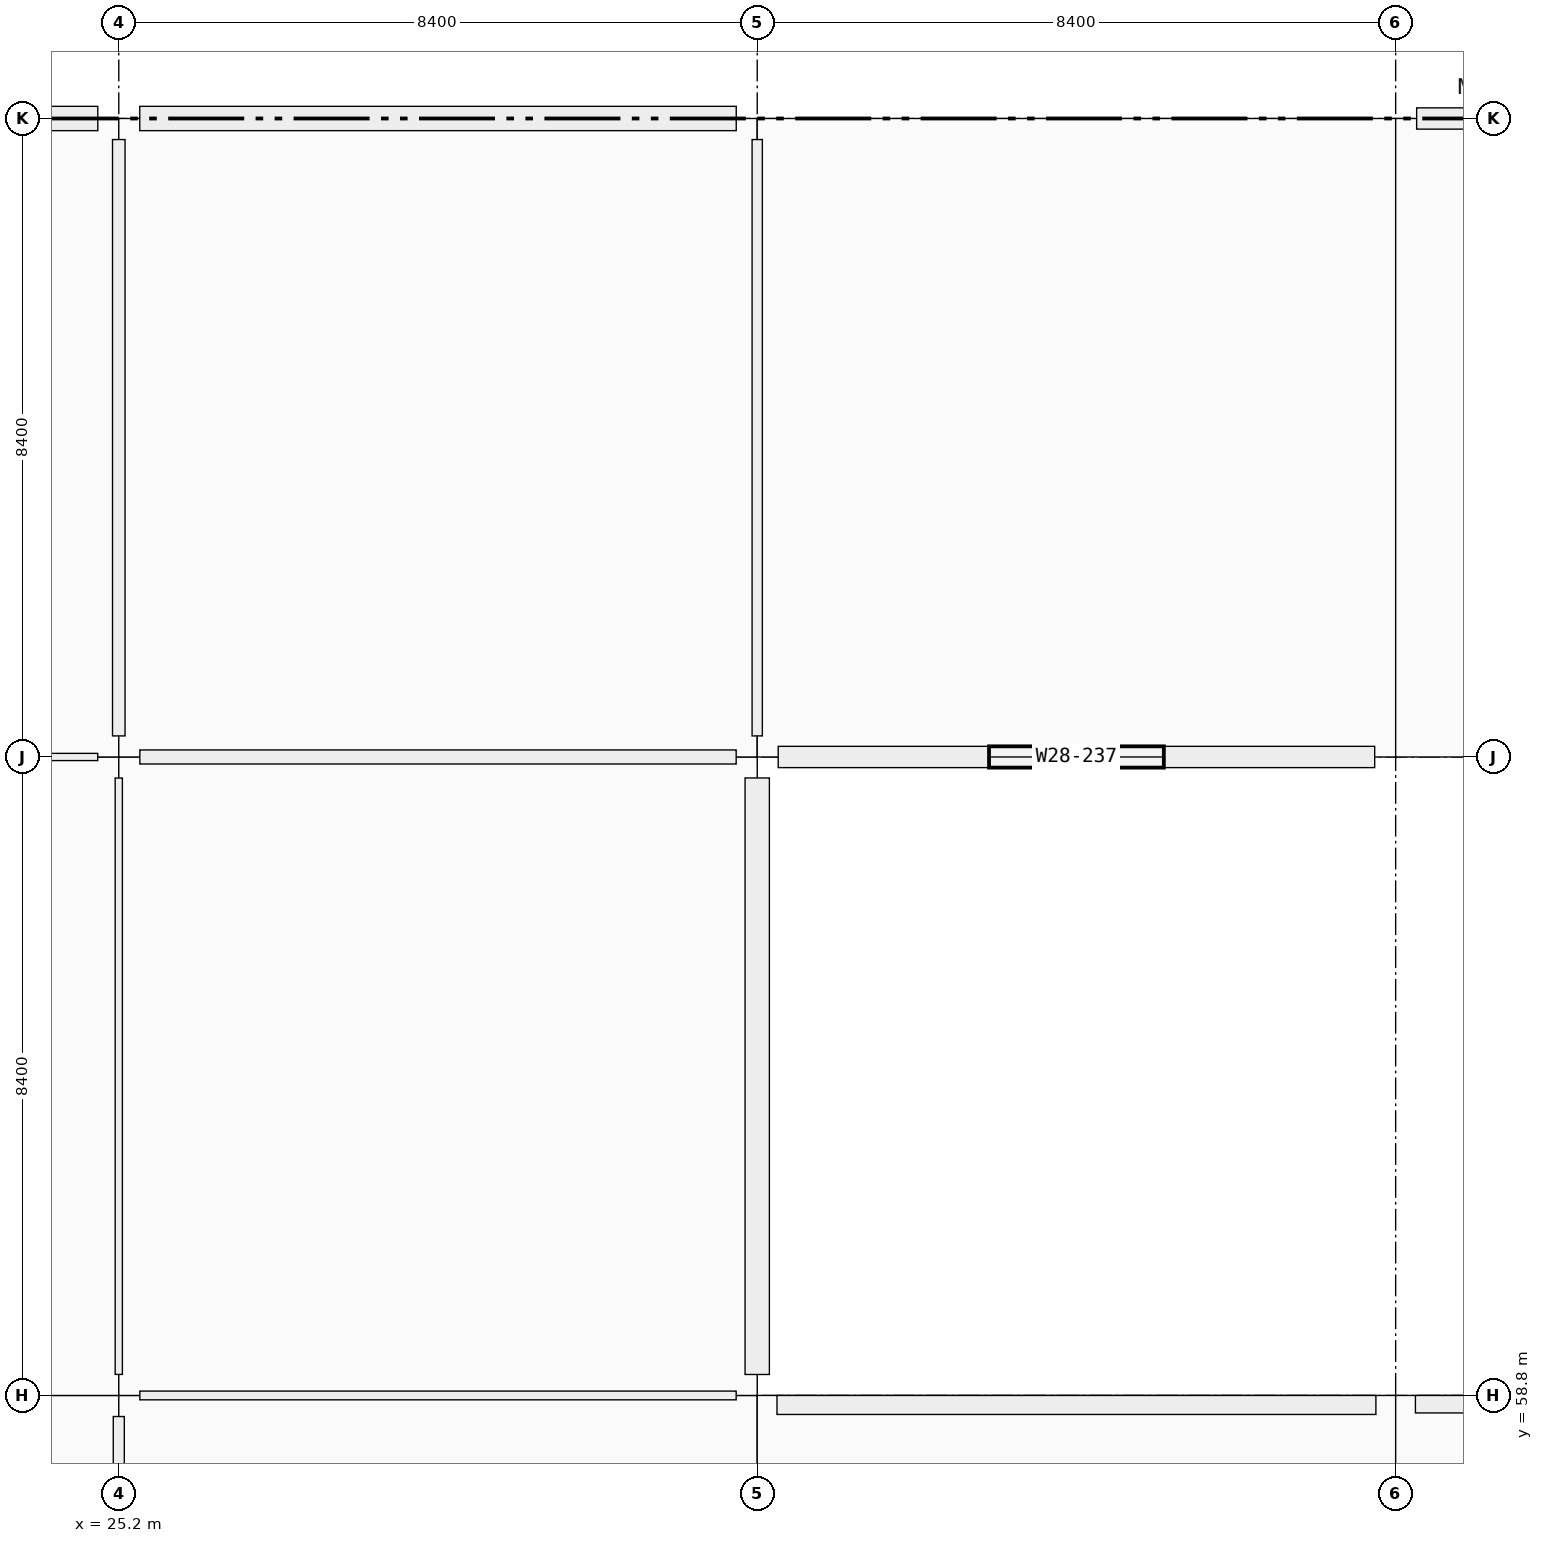
"""IFC4 building model, lengths in metres.
Left out: names, types, materials, properties, quantities, classifications, styles, units other than length and angle.
Written with IfcOpenShell. Run it as: python <this file> out.ifc"""

import sys

from ifc_helpers import new_model, si_unit, direction, frame, frame_2d, origin, origin_2d, place, context, subcontext, project, spatial, rectangle, i_section, extrude, element, fill, save


model = new_model("IFC4")
c1 = context("Model", 3, precision=1e-05, world=origin(), true_north=direction((0.0, 1.0)))
c2 = subcontext(c1, "Body", "Model", "MODEL_VIEW")
j1 = project(units=[si_unit("LENGTHUNIT", "METRE"), si_unit("PLANEANGLEUNIT", "RADIAN")], contexts=[c1])
p1 = place(None, origin())
s1 = spatial("IfcSite", under=j1, at=p1, CompositionType="ELEMENT")
p2 = place(p1, origin())
s2 = spatial("IfcBuilding", under=s1, at=p2, CompositionType="ELEMENT")
p3 = place(p2, frame((0.0, 0.0, 19.08)))
s3 = spatial("IfcBuildingStorey", under=s2, at=p3, CompositionType="ELEMENT", Elevation=19.08)
for number, where, z_axis, x_axis in (
    (1, (25.2, 58.8, 0.0), (0.0, 0.0, 1.0), (1.0, 0.0, 0.0)),
    (2, (25.2, 67.2, 0.0), (0.0, 0.0, 1.0), (1.0, 0.0, 0.0)),
    (3, (25.2, 75.6, 0.0), (0.0, 0.0, 1.0), (1.0, 0.0, 0.0)),
    (4, (33.6, 58.8, 0.0), (0.0, 0.0, 1.0), (1.0, 0.0, 0.0)),
    (5, (33.6, 67.2, 0.0), (0.0, 0.0, 1.0), (1.0, 0.0, 0.0)),
    (6, (33.6, 75.6, 0.0), (0.0, 0.0, 1.0), (1.0, 0.0, 0.0)),
):
    element("IfcColumn", number, at=place(p3, frame(where, z_axis=z_axis, x_axis=x_axis)), inside=s3, PredefinedType="COLUMN", context=c2, shape_type="SweptSolid", body=[
        extrude(rectangle(XDim=0.55, YDim=0.55, at=origin_2d()), origin(), (0.0, 0.0, 1.0), 4.16),
    ])
for number, where, z_axis, x_axis in (
    (7, (42.0, 67.2, 0.0), (0.0, 0.0, 1.0), (1.0, 0.0, 0.0)),
    (8, (42.0, 75.6, 0.0), (0.0, 0.0, 1.0), (1.0, 0.0, 0.0)),
):
    element("IfcColumn", number, at=place(p3, frame(where, z_axis=z_axis, x_axis=x_axis)), inside=s3, PredefinedType="COLUMN", context=c2, shape_type="SweptSolid", body=[
        extrude(rectangle(XDim=0.55, YDim=0.55, at=origin_2d()), origin(), (0.0, 0.0, 1.0), 4.07),
    ])
for number, where, z_axis, x_axis in (
    (9, (25.2, 58.8, 4.16), (0.0, 0.0, 1.0), (1.0, 0.0, 0.0)),
    (10, (25.2, 67.2, 4.16), (0.0, 0.0, 1.0), (1.0, 0.0, 0.0)),
    (11, (25.2, 75.6, 4.16), (0.0, 0.0, 1.0), (1.0, 0.0, 0.0)),
):
    element("IfcColumn", number, at=place(p3, frame(where, z_axis=z_axis, x_axis=x_axis)), inside=s3, PredefinedType="COLUMN", context=c2, shape_type="SweptSolid", body=[
        extrude(i_section(OverallWidth=0.305, OverallDepth=0.308, WebThickness=0.01, FlangeThickness=0.015, FilletRadius=0.017, at=origin_2d()), origin(), (0.0, 0.0, 1.0), 1.925),
    ])
p4 = place(p3, frame((17.076, 75.6, 0.0), z_axis=(0.0, 0.0, 1.0), x_axis=(1.0, 0.0, 0.0)))
e12 = element("IfcWall", 12, at=p4, inside=s3, PredefinedType="SOLIDWALL", context=c2, shape_type="SweptSolid", body=[
    extrude(rectangle(XDim=7.848, YDim=0.32, at=frame_2d((3.924, 0.0))), origin(), (0.0, 0.0, 1.0), 3.37),
])
p5 = place(p3, frame((33.6, 66.924, 0.0), z_axis=(0.0, 0.0, 1.0), x_axis=(0.0, -1.0, 0.0)))
e13 = element("IfcWall", 13, at=p5, inside=s3, PredefinedType="SOLIDWALL", context=c2, shape_type="SweptSolid", body=[
    extrude(rectangle(XDim=7.848, YDim=0.32, at=frame_2d((3.924, 0.0))), origin(), (0.0, 0.0, 1.0), 3.37),
])
p6 = place(p5, frame((3.474, 0.0, 0.9)))
e14 = element("IfcOpeningElement", 14, at=p6, cuts=e13, PredefinedType="OPENING", context=c2, shape_type="SweptSolid", body=[
    extrude(rectangle(XDim=0.9, YDim=1.5, at=frame_2d((0.45, 0.75))), frame((0.0, 0.16, 0.0), z_axis=(0.0, -1.0, 0.0), x_axis=(1.0, 0.0, 0.0)), (0.0, 0.0, 1.0), 0.32),
])
p7 = place(p3, frame((25.476, 75.6, 0.0), z_axis=(0.0, 0.0, 1.0), x_axis=(1.0, 0.0, 0.0)))
e15 = element("IfcWall", 15, at=p7, inside=s3, PredefinedType="SOLIDWALL", context=c2, shape_type="SweptSolid", body=[
    extrude(rectangle(XDim=7.848, YDim=0.32, at=frame_2d((3.924, 0.0))), origin(), (0.0, 0.0, 1.0), 3.37),
])
p8 = place(p7, frame((3.074, 0.0, 0.9)))
e16 = element("IfcOpeningElement", 16, at=p8, cuts=e15, PredefinedType="OPENING", context=c2, shape_type="SweptSolid", body=[
    extrude(rectangle(XDim=1.7, YDim=1.85, at=frame_2d((0.85, 0.925))), frame((0.0, 0.16, 0.0), z_axis=(0.0, -1.0, 0.0), x_axis=(1.0, 0.0, 0.0)), (0.0, 0.0, 1.0), 0.32),
])
p9 = place(p3, frame((41.724, 67.2, 0.0), z_axis=(0.0, 0.0, 1.0), x_axis=(-1.0, 0.0, 0.0)))
e17 = element("IfcWall", 17, at=p9, inside=s3, PredefinedType="SOLIDWALL", context=c2, shape_type="SweptSolid", body=[
    extrude(rectangle(XDim=7.848, YDim=0.28, at=frame_2d((3.924, 0.0))), origin(), (0.0, 0.0, 1.0), 3.37),
])
p10 = place(p9, frame((2.774, 0.0, 0.9)))
e18 = element("IfcOpeningElement", 18, at=p10, cuts=e17, PredefinedType="OPENING", context=c2, shape_type="SweptSolid", body=[
    extrude(rectangle(XDim=2.3, YDim=1.85, at=frame_2d((1.15, 0.925))), frame((0.0, 0.14, 0.0), z_axis=(0.0, -1.0, 0.0), x_axis=(1.0, 0.0, 0.0)), (0.0, 0.0, 1.0), 0.28),
])
p11 = place(p3, frame((42.276, 75.6, 0.0), z_axis=(0.0, 0.0, 1.0), x_axis=(1.0, 0.0, 0.0)))
e19 = element("IfcWall", 19, at=p11, inside=s3, PredefinedType="SOLIDWALL", context=c2, shape_type="SweptSolid", body=[
    extrude(rectangle(XDim=7.848, YDim=0.28, at=frame_2d((3.924, 0.0))), origin(), (0.0, 0.0, 1.0), 3.37),
])
p12 = place(p11, frame((2.474, 0.0, 0.9)))
e20 = element("IfcOpeningElement", 20, at=p12, cuts=e19, PredefinedType="OPENING", context=c2, shape_type="SweptSolid", body=[
    extrude(rectangle(XDim=2.9, YDim=1.85, at=frame_2d((1.45, 0.925))), frame((0.0, 0.14, 0.0), z_axis=(0.0, -1.0, 0.0), x_axis=(1.0, 0.0, 0.0)), (0.0, 0.0, 1.0), 0.28),
])
p13 = place(p3, frame((33.86, 58.675, 0.0), z_axis=(0.0, 0.0, 1.0), x_axis=(1.0, 0.0, 0.0)))
e21 = element("IfcWall", 21, at=p13, inside=s3, PredefinedType="PARAPET", context=c2, shape_type="SweptSolid", body=[
    extrude(rectangle(XDim=7.88, YDim=0.25, at=frame_2d((3.94, 0.0))), origin(), (0.0, 0.0, 1.0), 0.95),
])
p14 = place(p3, frame((42.26, 58.685, 0.0), z_axis=(0.0, 0.0, 1.0), x_axis=(1.0, 0.0, 0.0)))
e22 = element("IfcWall", 22, at=p14, inside=s3, PredefinedType="PARAPET", context=c2, shape_type="SweptSolid", body=[
    extrude(rectangle(XDim=7.88, YDim=0.23, at=frame_2d((3.94, 0.0))), origin(), (0.0, 0.0, 1.0), 0.95),
])
p15 = place(p3, frame((17.077, 67.2, 0.0), z_axis=(0.0, 0.0, 1.0), x_axis=(1.0, 0.0, 0.0)))
e23 = element("IfcWall", 23, at=p15, inside=s3, PredefinedType="PARTITIONING", context=c2, shape_type="SweptSolid", body=[
    extrude(rectangle(XDim=7.846, YDim=0.095, at=frame_2d((3.923, 0.0))), origin(), (0.0, 0.0, 1.0), 3.19),
])
p16 = place(p15, frame((3.458, 0.0, 0.0)))
e24 = element("IfcOpeningElement", 24, at=p16, cuts=e23, PredefinedType="OPENING", context=c2, shape_type="SweptSolid", body=[
    extrude(rectangle(XDim=0.93, YDim=2.12, at=frame_2d((0.465, 1.06))), frame((0.0, 0.047, 0.0), z_axis=(0.0, -1.0, 0.0), x_axis=(1.0, 0.0, 0.0)), (0.0, 0.0, 1.0), 0.095),
])
p17 = place(p3, frame((25.477, 58.8, 0.0), z_axis=(0.0, 0.0, 1.0), x_axis=(1.0, 0.0, 0.0)))
e25 = element("IfcWall", 25, at=p17, inside=s3, PredefinedType="PARTITIONING", context=c2, shape_type="SweptSolid", body=[
    extrude(rectangle(XDim=7.846, YDim=0.115, at=frame_2d((3.923, 0.0))), origin(), (0.0, 0.0, 1.0), 3.19),
])
p18 = place(p17, frame((3.443, 0.0, 0.0)))
e26 = element("IfcOpeningElement", 26, at=p18, cuts=e25, PredefinedType="OPENING", context=c2, shape_type="SweptSolid", body=[
    extrude(rectangle(XDim=0.96, YDim=2.18, at=frame_2d((0.48, 1.09))), frame((0.0, 0.058, 0.0), z_axis=(0.0, -1.0, 0.0), x_axis=(1.0, 0.0, 0.0)), (0.0, 0.0, 1.0), 0.115),
])
p19 = place(p3, frame((25.477, 67.2, 0.0), z_axis=(0.0, 0.0, 1.0), x_axis=(1.0, 0.0, 0.0)))
e27 = element("IfcWall", 27, at=p19, inside=s3, PredefinedType="PARTITIONING", context=c2, shape_type="SweptSolid", body=[
    extrude(rectangle(XDim=7.846, YDim=0.185, at=frame_2d((3.923, 0.0))), origin(), (0.0, 0.0, 1.0), 3.19),
])
p20 = place(p19, frame((3.453, 0.0, 0.0)))
e28 = element("IfcOpeningElement", 28, at=p20, cuts=e27, PredefinedType="OPENING", context=c2, shape_type="SweptSolid", body=[
    extrude(rectangle(XDim=0.94, YDim=2.15, at=frame_2d((0.47, 1.075))), frame((0.0, 0.093, 0.0), z_axis=(0.0, -1.0, 0.0), x_axis=(1.0, 0.0, 0.0)), (0.0, 0.0, 1.0), 0.185),
])
p21 = place(p3, frame((25.2, 50.677, 0.0), z_axis=(0.0, 0.0, 1.0), x_axis=(0.0, 1.0, 0.0)))
e29 = element("IfcWall", 29, at=p21, inside=s3, PredefinedType="PARTITIONING", context=c2, shape_type="SweptSolid", body=[
    extrude(rectangle(XDim=7.846, YDim=0.145, at=frame_2d((3.923, 0.0))), origin(), (0.0, 0.0, 1.0), 3.19),
])
p22 = place(p21, frame((3.423, 0.0, 0.0)))
e30 = element("IfcOpeningElement", 30, at=p22, cuts=e29, PredefinedType="OPENING", context=c2, shape_type="SweptSolid", body=[
    extrude(rectangle(XDim=1.0, YDim=2.2, at=frame_2d((0.5, 1.1))), frame((0.0, 0.073, 0.0), z_axis=(0.0, -1.0, 0.0), x_axis=(1.0, 0.0, 0.0)), (0.0, 0.0, 1.0), 0.145),
])
p23 = place(p3, frame((25.2, 59.077, 0.0), z_axis=(0.0, 0.0, 1.0), x_axis=(0.0, 1.0, 0.0)))
e31 = element("IfcWall", 31, at=p23, inside=s3, PredefinedType="PARTITIONING", context=c2, shape_type="SweptSolid", body=[
    extrude(rectangle(XDim=7.846, YDim=0.095, at=frame_2d((3.923, 0.0))), origin(), (0.0, 0.0, 1.0), 3.19),
])
p24 = place(p23, frame((3.433, 0.0, 0.0)))
e32 = element("IfcOpeningElement", 32, at=p24, cuts=e31, PredefinedType="OPENING", context=c2, shape_type="SweptSolid", body=[
    extrude(rectangle(XDim=0.98, YDim=2.18, at=frame_2d((0.49, 1.09))), frame((0.0, 0.047, 0.0), z_axis=(0.0, -1.0, 0.0), x_axis=(1.0, 0.0, 0.0)), (0.0, 0.0, 1.0), 0.095),
])
p25 = place(p3, frame((25.2, 67.477, 0.0), z_axis=(0.0, 0.0, 1.0), x_axis=(0.0, 1.0, 0.0)))
e33 = element("IfcWall", 33, at=p25, inside=s3, PredefinedType="PARTITIONING", context=c2, shape_type="SweptSolid", body=[
    extrude(rectangle(XDim=7.846, YDim=0.165, at=frame_2d((3.923, 0.0))), origin(), (0.0, 0.0, 1.0), 3.19),
])
p26 = place(p25, frame((3.438, 0.0, 0.0)))
e34 = element("IfcOpeningElement", 34, at=p26, cuts=e33, PredefinedType="OPENING", context=c2, shape_type="SweptSolid", body=[
    extrude(rectangle(XDim=0.97, YDim=2.12, at=frame_2d((0.485, 1.06))), frame((0.0, 0.083, 0.0), z_axis=(0.0, -1.0, 0.0), x_axis=(1.0, 0.0, 0.0)), (0.0, 0.0, 1.0), 0.165),
])
p27 = place(p3, frame((33.6, 67.477, 0.0), z_axis=(0.0, 0.0, 1.0), x_axis=(0.0, 1.0, 0.0)))
e35 = element("IfcWall", 35, at=p27, inside=s3, PredefinedType="PARTITIONING", context=c2, shape_type="SweptSolid", body=[
    extrude(rectangle(XDim=7.846, YDim=0.135, at=frame_2d((3.923, 0.0))), origin(), (0.0, 0.0, 1.0), 3.19),
])
p28 = place(p27, frame((3.443, 0.0, 0.0)))
e36 = element("IfcOpeningElement", 36, at=p28, cuts=e35, PredefinedType="OPENING", context=c2, shape_type="SweptSolid", body=[
    extrude(rectangle(XDim=0.96, YDim=2.18, at=frame_2d((0.48, 1.09))), frame((0.0, 0.067, 0.0), z_axis=(0.0, -1.0, 0.0), x_axis=(1.0, 0.0, 0.0)), (0.0, 0.0, 1.0), 0.135),
])
p29 = place(p6, origin())
e37 = element("IfcWindow", 37, at=p29, inside=s3, PartitioningType="SINGLE_PANEL", PredefinedType="WINDOW", context=c2, shape_type="SweptSolid", body=[
    extrude(rectangle(XDim=0.9, YDim=1.5, at=frame_2d((0.45, 0.75))), frame((0.0, 0.03, 0.0), z_axis=(0.0, -1.0, 0.0), x_axis=(1.0, 0.0, 0.0)), (0.0, 0.0, 1.0), 0.06),
])
fill(e14, e37)
p30 = place(p8, origin())
e38 = element("IfcWindow", 38, at=p30, inside=s3, PartitioningType="SINGLE_PANEL", PredefinedType="WINDOW", context=c2, shape_type="SweptSolid", body=[
    extrude(rectangle(XDim=1.7, YDim=1.85, at=frame_2d((0.85, 0.925))), frame((0.0, 0.03, 0.0), z_axis=(0.0, -1.0, 0.0), x_axis=(1.0, 0.0, 0.0)), (0.0, 0.0, 1.0), 0.06),
])
fill(e16, e38)
p31 = place(p10, origin())
e39 = element("IfcWindow", 39, at=p31, inside=s3, PartitioningType="SINGLE_PANEL", PredefinedType="WINDOW", context=c2, shape_type="SweptSolid", body=[
    extrude(rectangle(XDim=2.3, YDim=1.85, at=frame_2d((1.15, 0.925))), frame((0.0, 0.03, 0.0), z_axis=(0.0, -1.0, 0.0), x_axis=(1.0, 0.0, 0.0)), (0.0, 0.0, 1.0), 0.06),
])
fill(e18, e39)
p32 = place(p24, origin())
e40 = element("IfcDoor", 40, at=p32, inside=s3, OperationType="SINGLE_SWING_LEFT", PredefinedType="DOOR", context=c2, shape_type="SweptSolid", body=[
    extrude(rectangle(XDim=0.98, YDim=2.18, at=frame_2d((0.49, 1.09))), frame((0.0, 0.025, 0.0), z_axis=(0.0, -1.0, 0.0), x_axis=(1.0, 0.0, 0.0)), (0.0, 0.0, 1.0), 0.05),
])
fill(e32, e40)
p33 = place(p28, origin())
e41 = element("IfcDoor", 41, at=p33, inside=s3, OperationType="SINGLE_SWING_RIGHT", PredefinedType="DOOR", context=c2, shape_type="SweptSolid", body=[
    extrude(rectangle(XDim=0.96, YDim=2.18, at=frame_2d((0.48, 1.09))), frame((0.0, 0.025, 0.0), z_axis=(0.0, -1.0, 0.0), x_axis=(1.0, 0.0, 0.0)), (0.0, 0.0, 1.0), 0.05),
])
fill(e36, e41)
p34 = place(p18, origin())
e42 = element("IfcDoor", 42, at=p34, inside=s3, OperationType="SINGLE_SWING_LEFT", PredefinedType="DOOR", context=c2, shape_type="SweptSolid", body=[
    extrude(rectangle(XDim=0.96, YDim=2.18, at=frame_2d((0.48, 1.09))), frame((0.0, 0.025, 0.0), z_axis=(0.0, -1.0, 0.0), x_axis=(1.0, 0.0, 0.0)), (0.0, 0.0, 1.0), 0.05),
])
fill(e26, e42)
p35 = place(p20, origin())
e43 = element("IfcDoor", 43, at=p35, inside=s3, OperationType="SINGLE_SWING_RIGHT", PredefinedType="DOOR", context=c2, shape_type="SweptSolid", body=[
    extrude(rectangle(XDim=0.94, YDim=2.15, at=frame_2d((0.47, 1.075))), frame((0.0, 0.025, 0.0), z_axis=(0.0, -1.0, 0.0), x_axis=(1.0, 0.0, 0.0)), (0.0, 0.0, 1.0), 0.05),
])
fill(e28, e43)
p36 = place(p26, origin())
e44 = element("IfcDoor", 44, at=p36, inside=s3, OperationType="SINGLE_SWING_RIGHT", PredefinedType="DOOR", context=c2, shape_type="SweptSolid", body=[
    extrude(rectangle(XDim=0.97, YDim=2.12, at=frame_2d((0.485, 1.06))), frame((0.0, 0.025, 0.0), z_axis=(0.0, -1.0, 0.0), x_axis=(1.0, 0.0, 0.0)), (0.0, 0.0, 1.0), 0.05),
])
fill(e34, e44)
save(model, sys.argv[1])
